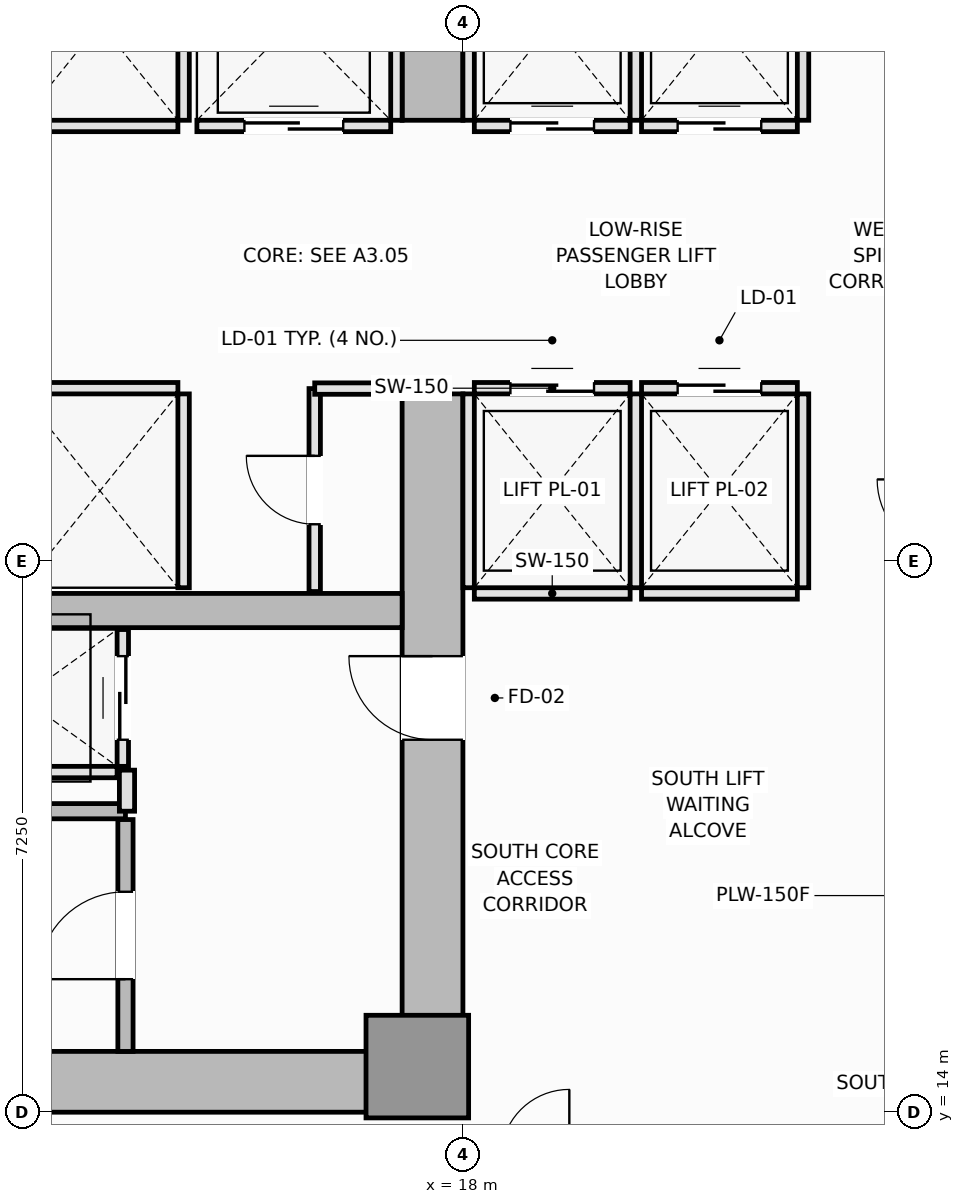
"""IFC4 building model, lengths in metres.
Left out: names, types, materials, properties, quantities, classifications, styles, units other than length and angle.
Written with IfcOpenShell. Run it as: python <this file> out.ifc"""

import sys

from ifc_helpers import new_model, si_unit, direction, frame, frame_2d, origin, origin_2d, place, context, subcontext, project, spatial, rectangle, extrude, element, fill, save


model = new_model("IFC4")
c1 = context("Model", 3, precision=1e-05, world=origin(), true_north=direction((0.0, 1.0)))
c2 = subcontext(c1, "Body", "Model", "MODEL_VIEW")
j1 = project(units=[si_unit("LENGTHUNIT", "METRE"), si_unit("PLANEANGLEUNIT", "RADIAN")], contexts=[c1])
p1 = place(None, origin())
s1 = spatial("IfcSite", under=j1, at=p1, CompositionType="ELEMENT")
p2 = place(p1, origin())
s2 = spatial("IfcBuilding", under=s1, at=p2, CompositionType="ELEMENT")
p3 = place(p2, frame((0.0, 0.0, 54.0)))
s3 = spatial("IfcBuildingStorey", under=s2, at=p3, CompositionType="ELEMENT", Elevation=54.0)
p4 = place(p3, frame((4.5, 14.4, 0.0), z_axis=(0.0, 0.0, 1.0), x_axis=(1.0, 0.0, 0.0)))
e1 = element("IfcWall", 1, at=p4, inside=s3, PredefinedType="SHEAR", context=c2, shape_type="SweptSolid", body=[
    extrude(rectangle(XDim=13.5, YDim=0.8, at=frame_2d((6.75, 0.0))), origin(), (0.0, 0.0, 1.0), 3.55),
])
p5 = place(p3, frame((17.6, 14.8, 0.0), z_axis=(0.0, 0.0, 1.0), x_axis=(0.0, 1.0, 0.0)))
e2 = element("IfcWall", 2, at=p5, inside=s3, PredefinedType="SHEAR", context=c2, shape_type="SweptSolid", body=[
    extrude(rectangle(XDim=8.65, YDim=0.8, at=frame_2d((4.325, 0.0))), origin(), (0.0, 0.0, 1.0), 3.55),
])
p6 = place(p5, frame((4.1, 0.0, 0.0)))
e3 = element("IfcOpeningElement", 3, at=p6, cuts=e2, PredefinedType="OPENING", context=c2, shape_type="SweptSolid", body=[
    extrude(rectangle(XDim=1.1, YDim=2.15, at=frame_2d((0.55, 1.075))), frame((0.0, 0.41, 0.0), z_axis=(0.0, -1.0, 0.0), x_axis=(1.0, 0.0, 0.0)), (0.0, 0.0, 1.0), 0.82),
])
p7 = place(p3, frame((17.6, 27.05, 0.0), z_axis=(0.0, 0.0, 1.0), x_axis=(0.0, 1.0, 0.0)))
e4 = element("IfcWall", 4, at=p7, inside=s3, PredefinedType="SHEAR", context=c2, shape_type="SweptSolid", body=[
    extrude(rectangle(XDim=8.65, YDim=0.8, at=frame_2d((4.325, 0.0))), origin(), (0.0, 0.0, 1.0), 3.55),
])
p8 = place(p7, frame((3.45, 0.0, 0.0)))
e5 = element("IfcOpeningElement", 5, at=p8, cuts=e4, PredefinedType="OPENING", context=c2, shape_type="SweptSolid", body=[
    extrude(rectangle(XDim=1.1, YDim=2.15, at=frame_2d((0.55, 1.075))), frame((0.0, 0.41, 0.0), z_axis=(0.0, -1.0, 0.0), x_axis=(1.0, 0.0, 0.0)), (0.0, 0.0, 1.0), 0.82),
])
p9 = place(p3, frame((5.3, 20.6, 0.0), z_axis=(0.0, 0.0, 1.0), x_axis=(1.0, 0.0, 0.0)))
e6 = element("IfcWall", 6, at=p9, inside=s3, PredefinedType="SHEAR", context=c2, shape_type="SweptSolid", body=[
    extrude(rectangle(XDim=11.9, YDim=0.45, at=frame_2d((5.95, 0.0))), origin(), (0.0, 0.0, 1.0), 3.55),
])
p10 = place(p3, frame((17.4, 14.6, 0.0), z_axis=(0.0, 0.0, 1.0), x_axis=(1.0, 0.0, 0.0)))
e7 = element("IfcColumn", 7, at=p10, inside=s3, PredefinedType="PILASTER", context=c2, shape_type="SweptSolid", body=[
    extrude(rectangle(XDim=1.35, YDim=1.35, at=origin_2d()), origin(), (0.0, 0.0, 1.0), 3.55),
])
p11 = place(p3, frame((5.9, 17.96, 0.0), z_axis=(0.0, 0.0, 1.0), x_axis=(1.0, 0.0, 0.0)))
e8 = element("IfcWall", 8, at=p11, inside=s3, PredefinedType="SOLIDWALL", context=c2, shape_type="SweptSolid", body=[
    extrude(rectangle(XDim=7.66, YDim=0.2, at=frame_2d((3.83, 0.0))), origin(), (0.0, 0.0, 1.0), 3.55),
])
p12 = place(p3, frame((13.56, 14.8, 0.0), z_axis=(0.0, 0.0, 1.0), x_axis=(0.0, 1.0, 0.0)))
e9 = element("IfcWall", 9, at=p12, inside=s3, PredefinedType="SOLIDWALL", context=c2, shape_type="SweptSolid", body=[
    extrude(rectangle(XDim=3.05, YDim=0.2, at=frame_2d((1.525, 0.0))), origin(), (0.0, 0.0, 1.0), 3.55),
])
p13 = place(p12, frame((0.95, 0.0, 0.0)))
e10 = element("IfcOpeningElement", 10, at=p13, cuts=e9, PredefinedType="OPENING", context=c2, shape_type="SweptSolid", body=[
    extrude(rectangle(XDim=1.15, YDim=2.15, at=frame_2d((0.575, 1.075))), frame((0.0, 0.11, 0.0), z_axis=(0.0, -1.0, 0.0), x_axis=(1.0, 0.0, 0.0)), (0.0, 0.0, 1.0), 0.22),
])
p14 = place(p3, frame((18.15, 20.825, 0.0), z_axis=(0.0, 0.0, 1.0), x_axis=(1.0, 0.0, 0.0)))
e11 = element("IfcWall", 11, at=p14, inside=s3, PredefinedType="PARTITIONING", context=c2, shape_type="SweptSolid", body=[
    extrude(rectangle(XDim=2.05, YDim=0.15, at=frame_2d((1.025, 0.0))), origin(), (0.0, 0.0, 1.0), 3.37),
])
p15 = place(p3, frame((18.15, 23.525, 0.0), z_axis=(0.0, 0.0, 1.0), x_axis=(1.0, 0.0, 0.0)))
e12 = element("IfcWall", 12, at=p15, inside=s3, PredefinedType="PARTITIONING", context=c2, shape_type="SweptSolid", body=[
    extrude(rectangle(XDim=2.05, YDim=0.15, at=frame_2d((1.025, 0.0))), origin(), (0.0, 0.0, 1.0), 3.37),
])
p16 = place(p15, frame((0.475, 0.0, 0.0)))
e13 = element("IfcOpeningElement", 13, at=p16, cuts=e12, PredefinedType="OPENING", context=c2, shape_type="SweptSolid", body=[
    extrude(rectangle(XDim=1.1, YDim=2.2, at=frame_2d((0.55, 1.1))), frame((0.0, 0.085, 0.0), z_axis=(0.0, -1.0, 0.0), x_axis=(1.0, 0.0, 0.0)), (0.0, 0.0, 1.0), 0.17),
])
for number, where, z_axis, x_axis in (
    (14, (18.075, 20.9, 0.0), (0.0, 0.0, 1.0), (0.0, 1.0, 0.0)),
    (15, (20.275, 20.9, 0.0), (0.0, 0.0, 1.0), (0.0, 1.0, 0.0)),
):
    element("IfcWall", number, at=place(p3, frame(where, z_axis=z_axis, x_axis=x_axis)), inside=s3, PredefinedType="PARTITIONING", context=c2, shape_type="SweptSolid", body=[
        extrude(rectangle(XDim=2.55, YDim=0.15, at=frame_2d((1.275, 0.0))), origin(), (0.0, 0.0, 1.0), 3.37),
    ])
p17 = place(p3, frame((20.35, 20.825, 0.0), z_axis=(0.0, 0.0, 1.0), x_axis=(1.0, 0.0, 0.0)))
e16 = element("IfcWall", 16, at=p17, inside=s3, PredefinedType="PARTITIONING", context=c2, shape_type="SweptSolid", body=[
    extrude(rectangle(XDim=2.05, YDim=0.15, at=frame_2d((1.025, 0.0))), origin(), (0.0, 0.0, 1.0), 3.37),
])
p18 = place(p3, frame((20.35, 23.525, 0.0), z_axis=(0.0, 0.0, 1.0), x_axis=(1.0, 0.0, 0.0)))
e17 = element("IfcWall", 17, at=p18, inside=s3, PredefinedType="PARTITIONING", context=c2, shape_type="SweptSolid", body=[
    extrude(rectangle(XDim=2.05, YDim=0.15, at=frame_2d((1.025, 0.0))), origin(), (0.0, 0.0, 1.0), 3.37),
])
p19 = place(p18, frame((0.475, 0.0, 0.0)))
e18 = element("IfcOpeningElement", 18, at=p19, cuts=e17, PredefinedType="OPENING", context=c2, shape_type="SweptSolid", body=[
    extrude(rectangle(XDim=1.1, YDim=2.2, at=frame_2d((0.55, 1.1))), frame((0.0, 0.085, 0.0), z_axis=(0.0, -1.0, 0.0), x_axis=(1.0, 0.0, 0.0)), (0.0, 0.0, 1.0), 0.17),
])
p20 = place(p3, frame((22.475, 20.9, 0.0), z_axis=(0.0, 0.0, 1.0), x_axis=(0.0, 1.0, 0.0)))
e19 = element("IfcWall", 19, at=p20, inside=s3, PredefinedType="PARTITIONING", context=c2, shape_type="SweptSolid", body=[
    extrude(rectangle(XDim=2.55, YDim=0.15, at=frame_2d((1.275, 0.0))), origin(), (0.0, 0.0, 1.0), 3.37),
])
p21 = place(p3, frame((18.15, 26.975, 0.0), z_axis=(0.0, 0.0, 1.0), x_axis=(1.0, 0.0, 0.0)))
e20 = element("IfcWall", 20, at=p21, inside=s3, PredefinedType="PARTITIONING", context=c2, shape_type="SweptSolid", body=[
    extrude(rectangle(XDim=2.05, YDim=0.15, at=frame_2d((1.025, 0.0))), origin(), (0.0, 0.0, 1.0), 3.37),
])
p22 = place(p21, frame((0.475, 0.0, 0.0)))
e21 = element("IfcOpeningElement", 21, at=p22, cuts=e20, PredefinedType="OPENING", context=c2, shape_type="SweptSolid", body=[
    extrude(rectangle(XDim=1.1, YDim=2.2, at=frame_2d((0.55, 1.1))), frame((0.0, 0.085, 0.0), z_axis=(0.0, -1.0, 0.0), x_axis=(1.0, 0.0, 0.0)), (0.0, 0.0, 1.0), 0.17),
])
for number, where, z_axis, x_axis in (
    (22, (18.075, 27.05, 0.0), (0.0, 0.0, 1.0), (0.0, 1.0, 0.0)),
    (23, (20.275, 27.05, 0.0), (0.0, 0.0, 1.0), (0.0, 1.0, 0.0)),
):
    element("IfcWall", number, at=place(p3, frame(where, z_axis=z_axis, x_axis=x_axis)), inside=s3, PredefinedType="PARTITIONING", context=c2, shape_type="SweptSolid", body=[
        extrude(rectangle(XDim=2.55, YDim=0.15, at=frame_2d((1.275, 0.0))), origin(), (0.0, 0.0, 1.0), 3.37),
    ])
p23 = place(p3, frame((20.35, 26.975, 0.0), z_axis=(0.0, 0.0, 1.0), x_axis=(1.0, 0.0, 0.0)))
e24 = element("IfcWall", 24, at=p23, inside=s3, PredefinedType="PARTITIONING", context=c2, shape_type="SweptSolid", body=[
    extrude(rectangle(XDim=2.05, YDim=0.15, at=frame_2d((1.025, 0.0))), origin(), (0.0, 0.0, 1.0), 3.37),
])
p24 = place(p23, frame((0.475, 0.0, 0.0)))
e25 = element("IfcOpeningElement", 25, at=p24, cuts=e24, PredefinedType="OPENING", context=c2, shape_type="SweptSolid", body=[
    extrude(rectangle(XDim=1.1, YDim=2.2, at=frame_2d((0.55, 1.1))), frame((0.0, 0.085, 0.0), z_axis=(0.0, -1.0, 0.0), x_axis=(1.0, 0.0, 0.0)), (0.0, 0.0, 1.0), 0.17),
])
p25 = place(p3, frame((22.475, 27.05, 0.0), z_axis=(0.0, 0.0, 1.0), x_axis=(0.0, 1.0, 0.0)))
e26 = element("IfcWall", 26, at=p25, inside=s3, PredefinedType="PARTITIONING", context=c2, shape_type="SweptSolid", body=[
    extrude(rectangle(XDim=2.55, YDim=0.15, at=frame_2d((1.275, 0.0))), origin(), (0.0, 0.0, 1.0), 3.37),
])
p26 = place(p3, frame((12.2, 23.525, 0.0), z_axis=(0.0, 0.0, 1.0), x_axis=(1.0, 0.0, 0.0)))
e27 = element("IfcWall", 27, at=p26, inside=s3, PredefinedType="PARTITIONING", context=c2, shape_type="SweptSolid", body=[
    extrude(rectangle(XDim=2.05, YDim=0.15, at=frame_2d((1.025, 0.0))), origin(), (0.0, 0.0, 1.0), 3.37),
])
p27 = place(p3, frame((14.325, 20.9, 0.0), z_axis=(0.0, 0.0, 1.0), x_axis=(0.0, 1.0, 0.0)))
e28 = element("IfcWall", 28, at=p27, inside=s3, PredefinedType="PARTITIONING", context=c2, shape_type="SweptSolid", body=[
    extrude(rectangle(XDim=2.55, YDim=0.15, at=frame_2d((1.275, 0.0))), origin(), (0.0, 0.0, 1.0), 3.37),
])
p28 = place(p3, frame((12.2, 26.975, 0.0), z_axis=(0.0, 0.0, 1.0), x_axis=(1.0, 0.0, 0.0)))
e29 = element("IfcWall", 29, at=p28, inside=s3, PredefinedType="PARTITIONING", context=c2, shape_type="SweptSolid", body=[
    extrude(rectangle(XDim=2.05, YDim=0.15, at=frame_2d((1.025, 0.0))), origin(), (0.0, 0.0, 1.0), 3.37),
])
p29 = place(p3, frame((14.325, 27.05, 0.0), z_axis=(0.0, 0.0, 1.0), x_axis=(0.0, 1.0, 0.0)))
e30 = element("IfcWall", 30, at=p29, inside=s3, PredefinedType="PARTITIONING", context=c2, shape_type="SweptSolid", body=[
    extrude(rectangle(XDim=2.55, YDim=0.15, at=frame_2d((1.275, 0.0))), origin(), (0.0, 0.0, 1.0), 3.37),
])
p30 = place(p3, frame((14.5, 26.975, 0.0), z_axis=(0.0, 0.0, 1.0), x_axis=(1.0, 0.0, 0.0)))
e31 = element("IfcWall", 31, at=p30, inside=s3, PredefinedType="PARTITIONING", context=c2, shape_type="SweptSolid", body=[
    extrude(rectangle(XDim=2.55, YDim=0.15, at=frame_2d((1.275, 0.0))), origin(), (0.0, 0.0, 1.0), 3.37),
])
p31 = place(p30, frame((0.625, 0.0, 0.0)))
e32 = element("IfcOpeningElement", 32, at=p31, cuts=e31, PredefinedType="OPENING", context=c2, shape_type="SweptSolid", body=[
    extrude(rectangle(XDim=1.3, YDim=2.2, at=frame_2d((0.65, 1.1))), frame((0.0, 0.085, 0.0), z_axis=(0.0, -1.0, 0.0), x_axis=(1.0, 0.0, 0.0)), (0.0, 0.0, 1.0), 0.17),
])
p32 = place(p3, frame((17.125, 27.05, 0.0), z_axis=(0.0, 0.0, 1.0), x_axis=(0.0, 1.0, 0.0)))
e33 = element("IfcWall", 33, at=p32, inside=s3, PredefinedType="PARTITIONING", context=c2, shape_type="SweptSolid", body=[
    extrude(rectangle(XDim=2.6, YDim=0.15, at=frame_2d((1.3, 0.0))), origin(), (0.0, 0.0, 1.0), 3.37),
])
p33 = place(p3, frame((10.95, 18.475, 0.0), z_axis=(0.0, 0.0, 1.0), x_axis=(1.0, 0.0, 0.0)))
e34 = element("IfcWall", 34, at=p33, inside=s3, PredefinedType="PARTITIONING", context=c2, shape_type="SweptSolid", body=[
    extrude(rectangle(XDim=2.5, YDim=0.15, at=frame_2d((1.25, 0.0))), origin(), (0.0, 0.0, 1.0), 3.37),
])
p34 = place(p3, frame((13.525, 18.55, 0.0), z_axis=(0.0, 0.0, 1.0), x_axis=(0.0, 1.0, 0.0)))
e35 = element("IfcWall", 35, at=p34, inside=s3, PredefinedType="PARTITIONING", context=c2, shape_type="SweptSolid", body=[
    extrude(rectangle(XDim=1.8, YDim=0.15, at=frame_2d((0.9, 0.0))), origin(), (0.0, 0.0, 1.0), 3.37),
])
p35 = place(p34, frame((0.35, 0.0, 0.0)))
e36 = element("IfcOpeningElement", 36, at=p35, cuts=e35, PredefinedType="OPENING", context=c2, shape_type="SweptSolid", body=[
    extrude(rectangle(XDim=1.1, YDim=2.2, at=frame_2d((0.55, 1.1))), frame((0.0, 0.085, 0.0), z_axis=(0.0, -1.0, 0.0), x_axis=(1.0, 0.0, 0.0)), (0.0, 0.0, 1.0), 0.17),
])
p36 = place(p3, frame((13.58, 17.96, 0.0), z_axis=(0.0, 0.0, 1.0), x_axis=(0.0, 1.0, 0.0)))
e37 = element("IfcWall", 37, at=p36, inside=s3, PredefinedType="PARTITIONING", context=c2, shape_type="SweptSolid", body=[
    extrude(rectangle(XDim=0.54, YDim=0.2, at=frame_2d((0.27, 0.0))), origin(), (0.0, 0.0, 1.0), 3.37),
])
p37 = place(p3, frame((16.05, 20.85, 0.0), z_axis=(0.0, 0.0, 1.0), x_axis=(0.0, 1.0, 0.0)))
e38 = element("IfcWall", 38, at=p37, inside=s3, PredefinedType="PARTITIONING", context=c2, shape_type="SweptSolid", body=[
    extrude(rectangle(XDim=2.67, YDim=0.15, at=frame_2d((1.335, 0.0))), origin(), (0.0, 0.0, 1.0), 3.37),
])
p38 = place(p37, frame((0.885, 0.0, 0.0)))
e39 = element("IfcOpeningElement", 39, at=p38, cuts=e38, PredefinedType="OPENING", context=c2, shape_type="SweptSolid", body=[
    extrude(rectangle(XDim=0.9, YDim=2.1, at=frame_2d((0.45, 1.05))), frame((0.0, 0.085, 0.0), z_axis=(0.0, -1.0, 0.0), x_axis=(1.0, 0.0, 0.0)), (0.0, 0.0, 1.0), 0.17),
])
p39 = place(p3, frame((16.05, 23.52, 0.0), z_axis=(0.0, 0.0, 1.0), x_axis=(1.0, 0.0, 0.0)))
e40 = element("IfcWall", 40, at=p39, inside=s3, PredefinedType="PARTITIONING", context=c2, shape_type="SweptSolid", body=[
    extrude(rectangle(XDim=1.17, YDim=0.15, at=frame_2d((0.585, 0.0))), origin(), (0.0, 0.0, 1.0), 3.37),
])
p40 = place(p13, origin())
e41 = element("IfcDoor", 41, at=p40, inside=s3, OperationType="SINGLE_SWING_LEFT", PredefinedType="DOOR", context=c2, shape_type="SweptSolid", body=[
    extrude(rectangle(XDim=1.15, YDim=2.15, at=frame_2d((0.575, 1.075))), frame((0.0, 0.025, 0.0), z_axis=(0.0, -1.0, 0.0), x_axis=(1.0, 0.0, 0.0)), (0.0, 0.0, 1.0), 0.05),
])
fill(e10, e41)
p41 = place(p16, origin())
e42 = element("IfcDoor", 42, at=p41, inside=s3, OperationType="DOUBLE_DOOR_SLIDING", PredefinedType="DOOR", context=c2, shape_type="SweptSolid", body=[
    extrude(rectangle(XDim=1.1, YDim=2.2, at=frame_2d((0.55, 1.1))), frame((0.0, 0.025, 0.0), z_axis=(0.0, -1.0, 0.0), x_axis=(1.0, 0.0, 0.0)), (0.0, 0.0, 1.0), 0.05),
])
fill(e13, e42)
p42 = place(p19, origin())
e43 = element("IfcDoor", 43, at=p42, inside=s3, OperationType="DOUBLE_DOOR_SLIDING", PredefinedType="DOOR", context=c2, shape_type="SweptSolid", body=[
    extrude(rectangle(XDim=1.1, YDim=2.2, at=frame_2d((0.55, 1.1))), frame((0.0, 0.025, 0.0), z_axis=(0.0, -1.0, 0.0), x_axis=(1.0, 0.0, 0.0)), (0.0, 0.0, 1.0), 0.05),
])
fill(e18, e43)
p43 = place(p22, origin())
e44 = element("IfcDoor", 44, at=p43, inside=s3, OperationType="DOUBLE_DOOR_SLIDING", PredefinedType="DOOR", context=c2, shape_type="SweptSolid", body=[
    extrude(rectangle(XDim=1.1, YDim=2.2, at=frame_2d((0.55, 1.1))), frame((0.0, 0.025, 0.0), z_axis=(0.0, -1.0, 0.0), x_axis=(1.0, 0.0, 0.0)), (0.0, 0.0, 1.0), 0.05),
])
fill(e21, e44)
p44 = place(p24, origin())
e45 = element("IfcDoor", 45, at=p44, inside=s3, OperationType="DOUBLE_DOOR_SLIDING", PredefinedType="DOOR", context=c2, shape_type="SweptSolid", body=[
    extrude(rectangle(XDim=1.1, YDim=2.2, at=frame_2d((0.55, 1.1))), frame((0.0, 0.025, 0.0), z_axis=(0.0, -1.0, 0.0), x_axis=(1.0, 0.0, 0.0)), (0.0, 0.0, 1.0), 0.05),
])
fill(e25, e45)
p45 = place(p31, origin())
e46 = element("IfcDoor", 46, at=p45, inside=s3, OperationType="DOUBLE_DOOR_SLIDING", PredefinedType="DOOR", context=c2, shape_type="SweptSolid", body=[
    extrude(rectangle(XDim=1.3, YDim=2.2, at=frame_2d((0.65, 1.1))), frame((0.0, 0.025, 0.0), z_axis=(0.0, -1.0, 0.0), x_axis=(1.0, 0.0, 0.0)), (0.0, 0.0, 1.0), 0.05),
])
fill(e32, e46)
p46 = place(p35, origin())
e47 = element("IfcDoor", 47, at=p46, inside=s3, OperationType="DOUBLE_DOOR_SLIDING", PredefinedType="DOOR", context=c2, shape_type="SweptSolid", body=[
    extrude(rectangle(XDim=1.1, YDim=2.2, at=frame_2d((0.55, 1.1))), frame((0.0, 0.025, 0.0), z_axis=(0.0, -1.0, 0.0), x_axis=(1.0, 0.0, 0.0)), (0.0, 0.0, 1.0), 0.05),
])
fill(e36, e47)
p47 = place(p6, origin())
e48 = element("IfcDoor", 48, at=p47, inside=s3, OperationType="SINGLE_SWING_RIGHT", PredefinedType="DOOR", context=c2, shape_type="SweptSolid", body=[
    extrude(rectangle(XDim=1.1, YDim=2.15, at=frame_2d((0.55, 1.075))), frame((0.0, 0.025, 0.0), z_axis=(0.0, -1.0, 0.0), x_axis=(1.0, 0.0, 0.0)), (0.0, 0.0, 1.0), 0.05),
])
fill(e3, e48)
p48 = place(p38, origin())
e49 = element("IfcDoor", 49, at=p48, inside=s3, OperationType="SINGLE_SWING_RIGHT", PredefinedType="DOOR", context=c2, shape_type="SweptSolid", body=[
    extrude(rectangle(XDim=0.9, YDim=2.1, at=frame_2d((0.45, 1.05))), frame((0.0, 0.025, 0.0), z_axis=(0.0, -1.0, 0.0), x_axis=(1.0, 0.0, 0.0)), (0.0, 0.0, 1.0), 0.05),
])
fill(e39, e49)
save(model, sys.argv[1])
